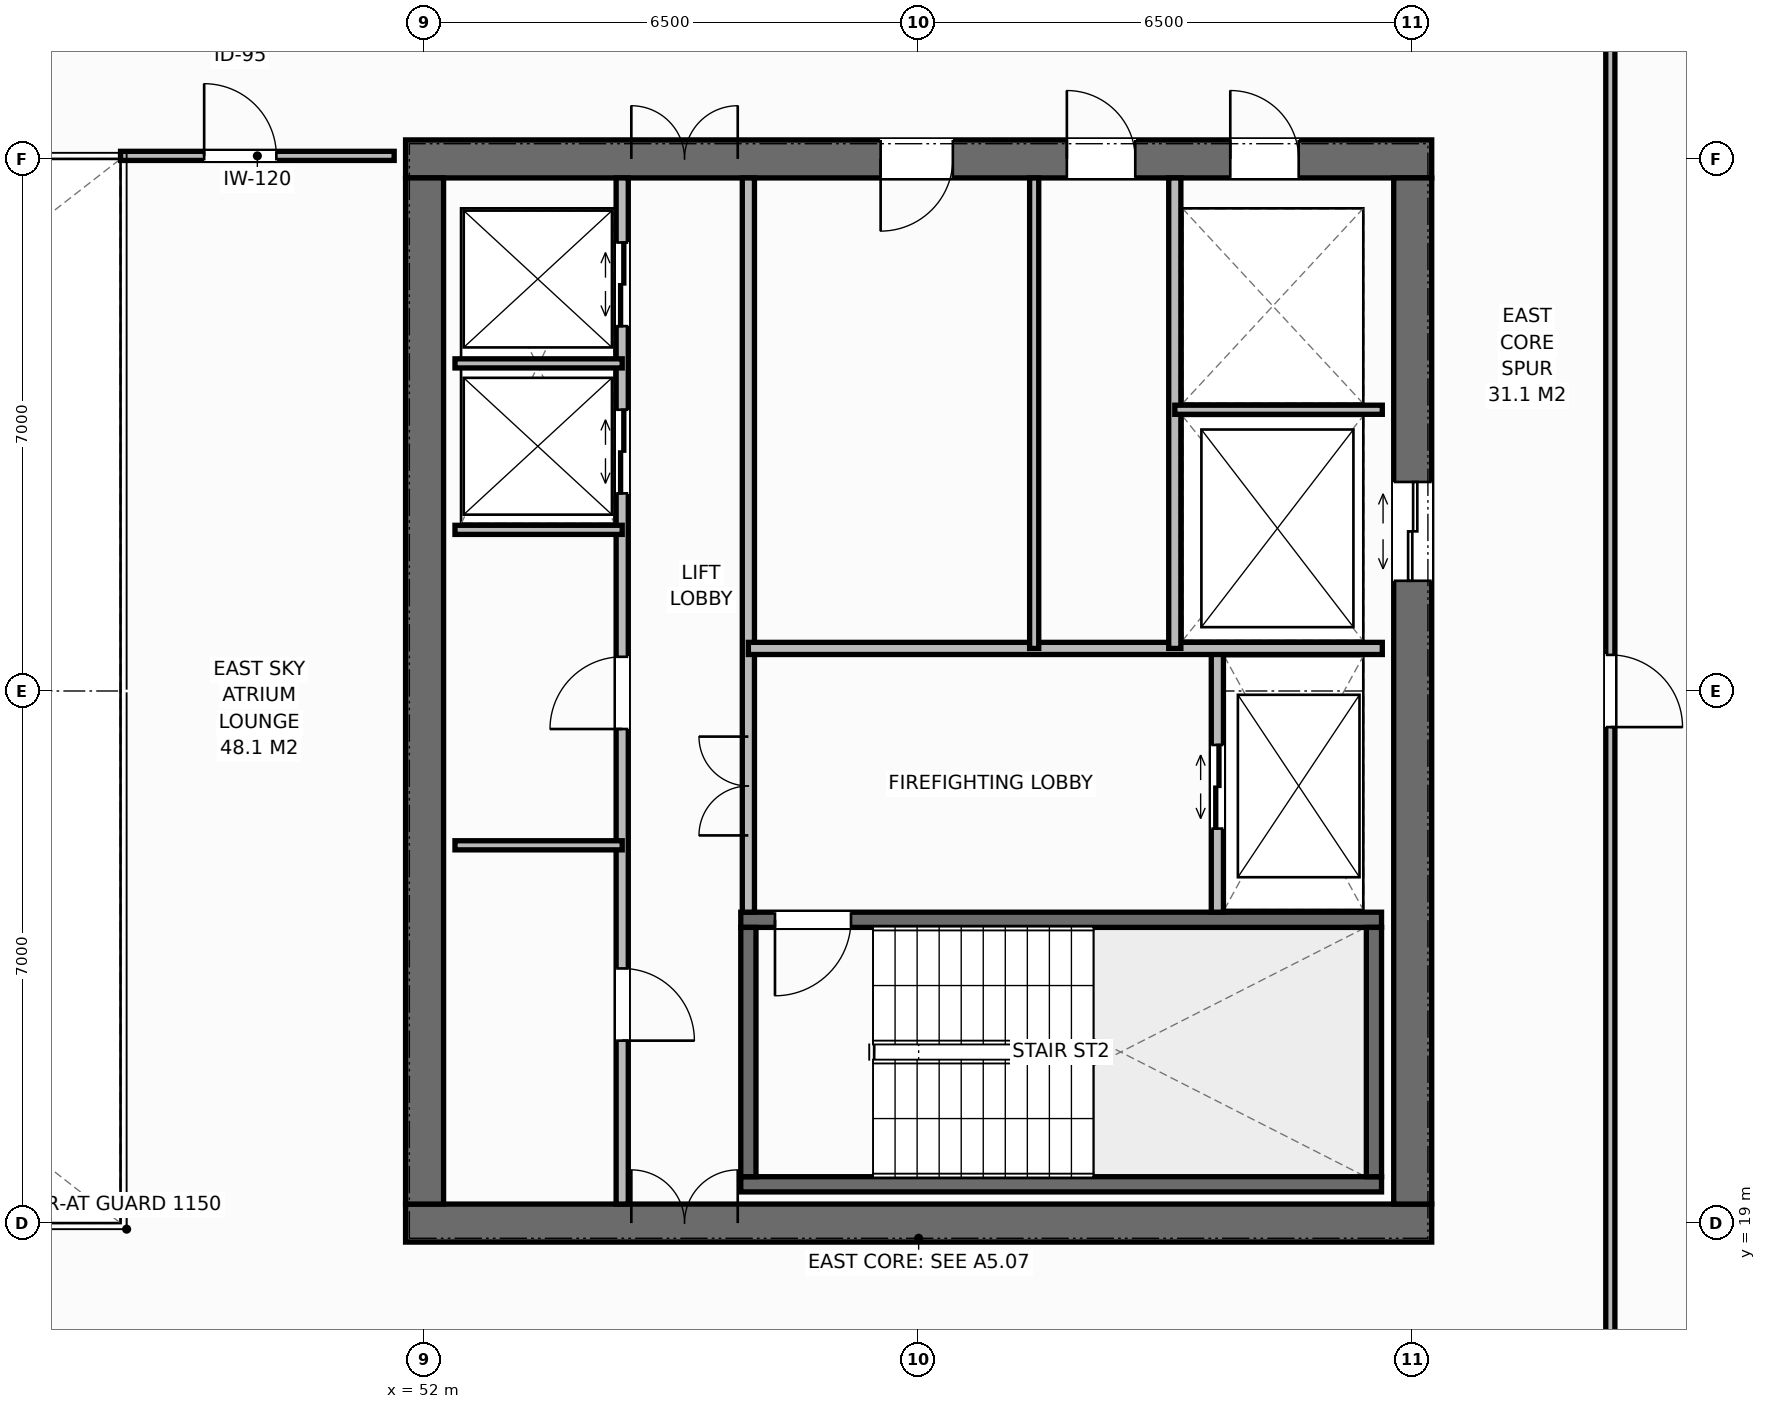
"""IFC4 building model, lengths in metres.
Left out: names, types, materials, properties, quantities, classifications, styles, units other than length and angle.
Written with IfcOpenShell. Run it as: python <this file> out.ifc"""

import sys

from ifc_helpers import new_model, si_unit, direction, frame, frame_2d, origin, place, context, subcontext, project, spatial, rectangle, extrude, element, fill, save


model = new_model("IFC4")
c1 = context("Model", 3, precision=1e-05, world=origin(), true_north=direction((0.0, 1.0)))
c2 = subcontext(c1, "Body", "Model", "MODEL_VIEW")
j1 = project(units=[si_unit("LENGTHUNIT", "METRE"), si_unit("PLANEANGLEUNIT", "RADIAN")], contexts=[c1])
p1 = place(None, origin())
s1 = spatial("IfcSite", under=j1, at=p1, CompositionType="ELEMENT")
p2 = place(p1, origin())
s2 = spatial("IfcBuilding", under=s1, at=p2, CompositionType="ELEMENT")
p3 = place(p2, frame((0.0, 0.0, 232.8)))
s3 = spatial("IfcBuildingStorey", under=s2, at=p3, CompositionType="ELEMENT", Elevation=232.8)
p4 = place(p3, frame((51.75, 19.0, 0.0), z_axis=(0.0, 0.0, 1.0), x_axis=(1.0, 0.0, 0.0)))
e1 = element("IfcWall", 1, at=p4, inside=s3, PredefinedType="SHEAR", context=c2, shape_type="SweptSolid", body=[
    extrude(rectangle(XDim=13.5, YDim=0.5, at=frame_2d((6.75, 0.0))), origin(), (0.0, 0.0, 1.0), 3.8),
])
p5 = place(p4, frame((2.97, 0.0, 0.0)))
e2 = element("IfcOpeningElement", 2, at=p5, cuts=e1, PredefinedType="OPENING", context=c2, shape_type="SweptSolid", body=[
    extrude(rectangle(XDim=1.4, YDim=2.2, at=frame_2d((0.7, 1.1))), frame((0.0, 0.26, 0.0), z_axis=(0.0, -1.0, 0.0), x_axis=(1.0, 0.0, 0.0)), (0.0, 0.0, 1.0), 0.52),
])
p6 = place(p3, frame((51.75, 33.0, 0.0), z_axis=(0.0, 0.0, 1.0), x_axis=(1.0, 0.0, 0.0)))
e3 = element("IfcWall", 3, at=p6, inside=s3, PredefinedType="SHEAR", context=c2, shape_type="SweptSolid", body=[
    extrude(rectangle(XDim=13.5, YDim=0.5, at=frame_2d((6.75, 0.0))), origin(), (0.0, 0.0, 1.0), 3.8),
])
p7 = place(p6, frame((2.97, 0.0, 0.0)))
e4 = element("IfcOpeningElement", 4, at=p7, cuts=e3, PredefinedType="OPENING", context=c2, shape_type="SweptSolid", body=[
    extrude(rectangle(XDim=1.4, YDim=2.2, at=frame_2d((0.7, 1.1))), frame((0.0, 0.26, 0.0), z_axis=(0.0, -1.0, 0.0), x_axis=(1.0, 0.0, 0.0)), (0.0, 0.0, 1.0), 0.52),
])
p8 = place(p6, frame((10.85, 0.0, 0.0)))
e5 = element("IfcOpeningElement", 5, at=p8, cuts=e3, PredefinedType="OPENING", context=c2, shape_type="SweptSolid", body=[
    extrude(rectangle(XDim=0.9, YDim=2.15, at=frame_2d((0.45, 1.075))), frame((0.0, 0.26, 0.0), z_axis=(0.0, -1.0, 0.0), x_axis=(1.0, 0.0, 0.0)), (0.0, 0.0, 1.0), 0.52),
])
p9 = place(p6, frame((6.25, 0.0, 0.0)))
e6 = element("IfcOpeningElement", 6, at=p9, cuts=e3, PredefinedType="OPENING", context=c2, shape_type="SweptSolid", body=[
    extrude(rectangle(XDim=0.95, YDim=2.15, at=frame_2d((0.475, 1.075))), frame((0.0, 0.26, 0.0), z_axis=(0.0, -1.0, 0.0), x_axis=(1.0, 0.0, 0.0)), (0.0, 0.0, 1.0), 0.52),
])
p10 = place(p6, frame((8.7, 0.0, 0.0)))
e7 = element("IfcOpeningElement", 7, at=p10, cuts=e3, PredefinedType="OPENING", context=c2, shape_type="SweptSolid", body=[
    extrude(rectangle(XDim=0.9, YDim=2.15, at=frame_2d((0.45, 1.075))), frame((0.0, 0.26, 0.0), z_axis=(0.0, -1.0, 0.0), x_axis=(1.0, 0.0, 0.0)), (0.0, 0.0, 1.0), 0.52),
])
p11 = place(p3, frame((52.0, 19.25, 0.0), z_axis=(0.0, 0.0, 1.0), x_axis=(0.0, 1.0, 0.0)))
e8 = element("IfcWall", 8, at=p11, inside=s3, PredefinedType="SHEAR", context=c2, shape_type="SweptSolid", body=[
    extrude(rectangle(XDim=13.5, YDim=0.5, at=frame_2d((6.75, 0.0))), origin(), (0.0, 0.0, 1.0), 3.8),
])
p12 = place(p3, frame((65.0, 19.25, 0.0), z_axis=(0.0, 0.0, 1.0), x_axis=(0.0, 1.0, 0.0)))
e9 = element("IfcWall", 9, at=p12, inside=s3, PredefinedType="SHEAR", context=c2, shape_type="SweptSolid", body=[
    extrude(rectangle(XDim=13.5, YDim=0.5, at=frame_2d((6.75, 0.0))), origin(), (0.0, 0.0, 1.0), 3.8),
])
p13 = place(p12, frame((8.2, 0.0, 0.0)))
e10 = element("IfcOpeningElement", 10, at=p13, cuts=e9, PredefinedType="OPENING", context=c2, shape_type="SweptSolid", body=[
    extrude(rectangle(XDim=1.3, YDim=2.2, at=frame_2d((0.65, 1.1))), frame((0.0, 0.26, 0.0), z_axis=(0.0, -1.0, 0.0), x_axis=(1.0, 0.0, 0.0)), (0.0, 0.0, 1.0), 0.52),
])
p14 = place(p3, frame((56.16, 19.51, 0.0), z_axis=(0.0, 0.0, 1.0), x_axis=(1.0, 0.0, 0.0)))
e11 = element("IfcWall", 11, at=p14, inside=s3, PredefinedType="SHEAR", context=c2, shape_type="SweptSolid", body=[
    extrude(rectangle(XDim=8.43, YDim=0.2, at=frame_2d((4.215, 0.0))), origin(), (0.0, 0.0, 1.0), 3.8),
])
p15 = place(p3, frame((56.16, 22.99, 0.0), z_axis=(0.0, 0.0, 1.0), x_axis=(1.0, 0.0, 0.0)))
e12 = element("IfcWall", 12, at=p15, inside=s3, PredefinedType="SHEAR", context=c2, shape_type="SweptSolid", body=[
    extrude(rectangle(XDim=8.43, YDim=0.2, at=frame_2d((4.215, 0.0))), origin(), (0.0, 0.0, 1.0), 3.8),
])
p16 = place(p15, frame((0.45, 0.0, 0.0)))
e13 = element("IfcOpeningElement", 13, at=p16, cuts=e12, PredefinedType="OPENING", context=c2, shape_type="SweptSolid", body=[
    extrude(rectangle(XDim=1.0, YDim=2.15, at=frame_2d((0.5, 1.075))), frame((0.0, 0.11, 0.0), z_axis=(0.0, -1.0, 0.0), x_axis=(1.0, 0.0, 0.0)), (0.0, 0.0, 1.0), 0.22),
])
for number, where, z_axis, x_axis in (
    (14, (56.26, 19.61, 0.0), (0.0, 0.0, 1.0), (0.0, 1.0, 0.0)),
    (15, (64.49, 19.61, 0.0), (0.0, 0.0, 1.0), (0.0, 1.0, 0.0)),
):
    element("IfcWall", number, at=place(p3, frame(where, z_axis=z_axis, x_axis=x_axis)), inside=s3, PredefinedType="SHEAR", context=c2, shape_type="SweptSolid", body=[
        extrude(rectangle(XDim=3.28, YDim=0.2, at=frame_2d((1.64, 0.0))), origin(), (0.0, 0.0, 1.0), 3.8),
    ])
p17 = place(p3, frame((54.6, 19.25, 0.0), z_axis=(0.0, 0.0, 1.0), x_axis=(0.0, 1.0, 0.0)))
e16 = element("IfcWall", 16, at=p17, inside=s3, PredefinedType="STANDARD", context=c2, shape_type="SweptSolid", body=[
    extrude(rectangle(XDim=13.5, YDim=0.16, at=frame_2d((6.75, 0.0))), origin(), (0.0, 0.0, 1.0), 3.58),
])
p18 = place(p17, frame((2.15, 0.0, 0.0)))
e17 = element("IfcOpeningElement", 17, at=p18, cuts=e16, PredefinedType="OPENING", context=c2, shape_type="SweptSolid", body=[
    extrude(rectangle(XDim=0.95, YDim=2.15, at=frame_2d((0.475, 1.075))), frame((0.0, 0.09, 0.0), z_axis=(0.0, -1.0, 0.0), x_axis=(1.0, 0.0, 0.0)), (0.0, 0.0, 1.0), 0.18),
])
p19 = place(p17, frame((6.25, 0.0, 0.0)))
e18 = element("IfcOpeningElement", 18, at=p19, cuts=e16, PredefinedType="OPENING", context=c2, shape_type="SweptSolid", body=[
    extrude(rectangle(XDim=0.95, YDim=2.15, at=frame_2d((0.475, 1.075))), frame((0.0, 0.09, 0.0), z_axis=(0.0, -1.0, 0.0), x_axis=(1.0, 0.0, 0.0)), (0.0, 0.0, 1.0), 0.18),
])
p20 = place(p17, frame((9.35, 0.0, 0.0)))
e19 = element("IfcOpeningElement", 19, at=p20, cuts=e16, PredefinedType="OPENING", context=c2, shape_type="SweptSolid", body=[
    extrude(rectangle(XDim=1.1, YDim=2.2, at=frame_2d((0.55, 1.1))), frame((0.0, 0.09, 0.0), z_axis=(0.0, -1.0, 0.0), x_axis=(1.0, 0.0, 0.0)), (0.0, 0.0, 1.0), 0.18),
])
p21 = place(p17, frame((11.55, 0.0, 0.0)))
e20 = element("IfcOpeningElement", 20, at=p21, cuts=e16, PredefinedType="OPENING", context=c2, shape_type="SweptSolid", body=[
    extrude(rectangle(XDim=1.1, YDim=2.2, at=frame_2d((0.55, 1.1))), frame((0.0, 0.09, 0.0), z_axis=(0.0, -1.0, 0.0), x_axis=(1.0, 0.0, 0.0)), (0.0, 0.0, 1.0), 0.18),
])
p22 = place(p3, frame((56.26, 23.09, 0.0), z_axis=(0.0, 0.0, 1.0), x_axis=(0.0, 1.0, 0.0)))
e21 = element("IfcWall", 21, at=p22, inside=s3, PredefinedType="STANDARD", context=c2, shape_type="SweptSolid", body=[
    extrude(rectangle(XDim=9.66, YDim=0.16, at=frame_2d((4.83, 0.0))), origin(), (0.0, 0.0, 1.0), 3.58),
])
p23 = place(p22, frame((1.01, 0.0, 0.0)))
e22 = element("IfcOpeningElement", 22, at=p23, cuts=e21, PredefinedType="OPENING", context=c2, shape_type="SweptSolid", body=[
    extrude(rectangle(XDim=1.3, YDim=2.2, at=frame_2d((0.65, 1.1))), frame((0.0, 0.09, 0.0), z_axis=(0.0, -1.0, 0.0), x_axis=(1.0, 0.0, 0.0)), (0.0, 0.0, 1.0), 0.18),
])
for number, where, z_axis, x_axis in (
    (23, (52.4, 23.97, 0.0), (0.0, 0.0, 1.0), (1.0, 0.0, 0.0)),
    (24, (52.4, 28.12, 0.0), (0.0, 0.0, 1.0), (1.0, 0.0, 0.0)),
    (25, (52.4, 30.31, 0.0), (0.0, 0.0, 1.0), (1.0, 0.0, 0.0)),
):
    element("IfcWall", number, at=place(p3, frame(where, z_axis=z_axis, x_axis=x_axis)), inside=s3, PredefinedType="PARTITIONING", context=c2, shape_type="SweptSolid", body=[
        extrude(rectangle(XDim=2.2, YDim=0.12, at=frame_2d((1.1, 0.0))), origin(), (0.0, 0.0, 1.0), 3.58),
    ])
p24 = place(p3, frame((62.43, 23.09, 0.0), z_axis=(0.0, 0.0, 1.0), x_axis=(0.0, 1.0, 0.0)))
e26 = element("IfcWall", 26, at=p24, inside=s3, PredefinedType="STANDARD", context=c2, shape_type="SweptSolid", body=[
    extrude(rectangle(XDim=3.47, YDim=0.16, at=frame_2d((1.735, 0.0))), origin(), (0.0, 0.0, 1.0), 3.58),
])
p25 = place(p24, frame((1.1, 0.0, 0.0)))
e27 = element("IfcOpeningElement", 27, at=p25, cuts=e26, PredefinedType="OPENING", context=c2, shape_type="SweptSolid", body=[
    extrude(rectangle(XDim=1.1, YDim=2.2, at=frame_2d((0.55, 1.1))), frame((0.0, 0.09, 0.0), z_axis=(0.0, -1.0, 0.0), x_axis=(1.0, 0.0, 0.0)), (0.0, 0.0, 1.0), 0.18),
])
p26 = place(p3, frame((56.26, 26.56, 0.0), z_axis=(0.0, 0.0, 1.0), x_axis=(1.0, 0.0, 0.0)))
e28 = element("IfcWall", 28, at=p26, inside=s3, PredefinedType="STANDARD", context=c2, shape_type="SweptSolid", body=[
    extrude(rectangle(XDim=8.34, YDim=0.16, at=frame_2d((4.17, 0.0))), origin(), (0.0, 0.0, 1.0), 3.58),
])
p27 = place(p3, frame((61.87, 26.56, 0.0), z_axis=(0.0, 0.0, 1.0), x_axis=(0.0, 1.0, 0.0)))
e29 = element("IfcWall", 29, at=p27, inside=s3, PredefinedType="STANDARD", context=c2, shape_type="SweptSolid", body=[
    extrude(rectangle(XDim=6.19, YDim=0.16, at=frame_2d((3.095, 0.0))), origin(), (0.0, 0.0, 1.0), 3.58),
])
p28 = place(p3, frame((61.87, 29.7, 0.0), z_axis=(0.0, 0.0, 1.0), x_axis=(1.0, 0.0, 0.0)))
e30 = element("IfcWall", 30, at=p28, inside=s3, PredefinedType="PARTITIONING", context=c2, shape_type="SweptSolid", body=[
    extrude(rectangle(XDim=2.73, YDim=0.12, at=frame_2d((1.365, 0.0))), origin(), (0.0, 0.0, 1.0), 3.58),
])
p29 = place(p3, frame((60.02, 26.56, 0.0), z_axis=(0.0, 0.0, 1.0), x_axis=(0.0, 1.0, 0.0)))
e31 = element("IfcWall", 31, at=p29, inside=s3, PredefinedType="PARTITIONING", context=c2, shape_type="SweptSolid", body=[
    extrude(rectangle(XDim=6.19, YDim=0.12, at=frame_2d((3.095, 0.0))), origin(), (0.0, 0.0, 1.0), 3.58),
])
p30 = place(p3, frame((48.0, 33.04, 0.0), z_axis=(0.0, 0.0, 1.0), x_axis=(1.0, 0.0, 0.0)))
e32 = element("IfcWall", 32, at=p30, inside=s3, PredefinedType="PARTITIONING", context=c2, shape_type="SweptSolid", body=[
    extrude(rectangle(XDim=3.6, YDim=0.12, at=frame_2d((1.8, 0.0))), origin(), (0.0, 0.0, 1.0), 3.32),
])
p31 = place(p30, frame((1.1, 0.0, 0.0)))
e33 = element("IfcOpeningElement", 33, at=p31, cuts=e32, PredefinedType="OPENING", context=c2, shape_type="SweptSolid", body=[
    extrude(rectangle(XDim=0.95, YDim=2.15, at=frame_2d((0.475, 1.075))), frame((0.0, 0.07, 0.0), z_axis=(0.0, -1.0, 0.0), x_axis=(1.0, 0.0, 0.0)), (0.0, 0.0, 1.0), 0.14),
])
p32 = place(p3, frame((67.6, 16.5, 0.0), z_axis=(0.0, 0.0, 1.0), x_axis=(0.0, 1.0, 0.0)))
e34 = element("IfcWall", 34, at=p32, inside=s3, PredefinedType="PARTITIONING", context=c2, shape_type="SweptSolid", body=[
    extrude(rectangle(XDim=19.0, YDim=0.12, at=frame_2d((9.5, 0.0))), origin(), (0.0, 0.0, 1.0), 3.58),
])
p33 = place(p32, frame((9.025, 0.0, 0.0)))
e35 = element("IfcOpeningElement", 35, at=p33, cuts=e34, PredefinedType="OPENING", context=c2, shape_type="SweptSolid", body=[
    extrude(rectangle(XDim=0.95, YDim=2.15, at=frame_2d((0.475, 1.075))), frame((0.0, 0.07, 0.0), z_axis=(0.0, -1.0, 0.0), x_axis=(1.0, 0.0, 0.0)), (0.0, 0.0, 1.0), 0.14),
])
p34 = place(p5, origin())
e36 = element("IfcDoor", 36, at=p34, inside=s3, OperationType="DOUBLE_DOOR_SINGLE_SWING", PredefinedType="DOOR", context=c2, shape_type="SweptSolid", body=[
    extrude(rectangle(XDim=1.4, YDim=2.2, at=frame_2d((0.7, 1.1))), frame((0.0, 0.075, 0.0), z_axis=(0.0, -1.0, 0.0), x_axis=(1.0, 0.0, 0.0)), (0.0, 0.0, 1.0), 0.05),
])
fill(e2, e36)
p35 = place(p7, origin())
e37 = element("IfcDoor", 37, at=p35, inside=s3, OperationType="DOUBLE_DOOR_SINGLE_SWING", PredefinedType="DOOR", context=c2, shape_type="SweptSolid", body=[
    extrude(rectangle(XDim=1.4, YDim=2.2, at=frame_2d((0.7, 1.1))), frame((0.0, -0.025, 0.0), z_axis=(0.0, -1.0, 0.0), x_axis=(1.0, 0.0, 0.0)), (0.0, 0.0, 1.0), 0.05),
])
fill(e4, e37)
p36 = place(p18, origin())
e38 = element("IfcDoor", 38, at=p36, inside=s3, OperationType="SINGLE_SWING_RIGHT", PredefinedType="DOOR", context=c2, shape_type="SweptSolid", body=[
    extrude(rectangle(XDim=0.95, YDim=2.15, at=frame_2d((0.475, 1.075))), frame((0.0, 0.025, 0.0), z_axis=(0.0, -1.0, 0.0), x_axis=(1.0, 0.0, 0.0)), (0.0, 0.0, 1.0), 0.05),
])
fill(e17, e38)
p37 = place(p19, origin())
e39 = element("IfcDoor", 39, at=p37, inside=s3, OperationType="SINGLE_SWING_LEFT", PredefinedType="DOOR", context=c2, shape_type="SweptSolid", body=[
    extrude(rectangle(XDim=0.95, YDim=2.15, at=frame_2d((0.475, 1.075))), frame((0.0, 0.025, 0.0), z_axis=(0.0, -1.0, 0.0), x_axis=(1.0, 0.0, 0.0)), (0.0, 0.0, 1.0), 0.05),
])
fill(e18, e39)
p38 = place(p20, origin())
e40 = element("IfcDoor", 40, at=p38, inside=s3, OperationType="DOUBLE_DOOR_SLIDING", PredefinedType="DOOR", context=c2, shape_type="SweptSolid", body=[
    extrude(rectangle(XDim=1.1, YDim=2.2, at=frame_2d((0.55, 1.1))), frame((0.0, 0.025, 0.0), z_axis=(0.0, -1.0, 0.0), x_axis=(1.0, 0.0, 0.0)), (0.0, 0.0, 1.0), 0.05),
])
fill(e19, e40)
p39 = place(p21, origin())
e41 = element("IfcDoor", 41, at=p39, inside=s3, OperationType="DOUBLE_DOOR_SLIDING", PredefinedType="DOOR", context=c2, shape_type="SweptSolid", body=[
    extrude(rectangle(XDim=1.1, YDim=2.2, at=frame_2d((0.55, 1.1))), frame((0.0, 0.025, 0.0), z_axis=(0.0, -1.0, 0.0), x_axis=(1.0, 0.0, 0.0)), (0.0, 0.0, 1.0), 0.05),
])
fill(e20, e41)
p40 = place(p16, origin())
e42 = element("IfcDoor", 42, at=p40, inside=s3, OperationType="SINGLE_SWING_RIGHT", PredefinedType="DOOR", context=c2, shape_type="SweptSolid", body=[
    extrude(rectangle(XDim=1.0, YDim=2.15, at=frame_2d((0.5, 1.075))), frame((0.0, 0.025, 0.0), z_axis=(0.0, -1.0, 0.0), x_axis=(1.0, 0.0, 0.0)), (0.0, 0.0, 1.0), 0.05),
])
fill(e13, e42)
p41 = place(p25, origin())
e43 = element("IfcDoor", 43, at=p41, inside=s3, OperationType="DOUBLE_DOOR_SLIDING", PredefinedType="DOOR", context=c2, shape_type="SweptSolid", body=[
    extrude(rectangle(XDim=1.1, YDim=2.2, at=frame_2d((0.55, 1.1))), frame((0.0, 0.025, 0.0), z_axis=(0.0, -1.0, 0.0), x_axis=(1.0, 0.0, 0.0)), (0.0, 0.0, 1.0), 0.05),
])
fill(e27, e43)
p42 = place(p23, origin())
e44 = element("IfcDoor", 44, at=p42, inside=s3, OperationType="DOUBLE_DOOR_SINGLE_SWING", PredefinedType="DOOR", context=c2, shape_type="SweptSolid", body=[
    extrude(rectangle(XDim=1.3, YDim=2.2, at=frame_2d((0.65, 1.1))), frame((0.0, 0.025, 0.0), z_axis=(0.0, -1.0, 0.0), x_axis=(1.0, 0.0, 0.0)), (0.0, 0.0, 1.0), 0.05),
])
fill(e22, e44)
p43 = place(p13, origin())
e45 = element("IfcDoor", 45, at=p43, inside=s3, OperationType="DOUBLE_DOOR_SLIDING", PredefinedType="DOOR", context=c2, shape_type="SweptSolid", body=[
    extrude(rectangle(XDim=1.3, YDim=2.2, at=frame_2d((0.65, 1.1))), frame((0.0, 0.025, 0.0), z_axis=(0.0, -1.0, 0.0), x_axis=(1.0, 0.0, 0.0)), (0.0, 0.0, 1.0), 0.05),
])
fill(e10, e45)
p44 = place(p8, origin())
e46 = element("IfcDoor", 46, at=p44, inside=s3, OperationType="SINGLE_SWING_LEFT", PredefinedType="DOOR", context=c2, shape_type="SweptSolid", body=[
    extrude(rectangle(XDim=0.9, YDim=2.15, at=frame_2d((0.45, 1.075))), frame((0.0, -0.025, 0.0), z_axis=(0.0, -1.0, 0.0), x_axis=(1.0, 0.0, 0.0)), (0.0, 0.0, 1.0), 0.05),
])
fill(e5, e46)
p45 = place(p9, origin())
e47 = element("IfcDoor", 47, at=p45, inside=s3, OperationType="SINGLE_SWING_RIGHT", PredefinedType="DOOR", context=c2, shape_type="SweptSolid", body=[
    extrude(rectangle(XDim=0.95, YDim=2.15, at=frame_2d((0.475, 1.075))), frame((0.0, -0.025, 0.0), z_axis=(0.0, -1.0, 0.0), x_axis=(1.0, 0.0, 0.0)), (0.0, 0.0, 1.0), 0.05),
])
fill(e6, e47)
p46 = place(p10, origin())
e48 = element("IfcDoor", 48, at=p46, inside=s3, OperationType="SINGLE_SWING_LEFT", PredefinedType="DOOR", context=c2, shape_type="SweptSolid", body=[
    extrude(rectangle(XDim=0.9, YDim=2.15, at=frame_2d((0.45, 1.075))), frame((0.0, -0.025, 0.0), z_axis=(0.0, -1.0, 0.0), x_axis=(1.0, 0.0, 0.0)), (0.0, 0.0, 1.0), 0.05),
])
fill(e7, e48)
p47 = place(p31, origin())
e49 = element("IfcDoor", 49, at=p47, inside=s3, OperationType="SINGLE_SWING_LEFT", PredefinedType="DOOR", context=c2, shape_type="SweptSolid", body=[
    extrude(rectangle(XDim=0.95, YDim=2.15, at=frame_2d((0.475, 1.075))), frame((0.0, 0.025, 0.0), z_axis=(0.0, -1.0, 0.0), x_axis=(1.0, 0.0, 0.0)), (0.0, 0.0, 1.0), 0.05),
])
fill(e33, e49)
p48 = place(p33, origin())
e50 = element("IfcDoor", 50, at=p48, inside=s3, OperationType="SINGLE_SWING_RIGHT", PredefinedType="DOOR", context=c2, shape_type="SweptSolid", body=[
    extrude(rectangle(XDim=0.95, YDim=2.15, at=frame_2d((0.475, 1.075))), frame((0.0, 0.025, 0.0), z_axis=(0.0, -1.0, 0.0), x_axis=(1.0, 0.0, 0.0)), (0.0, 0.0, 1.0), 0.05),
])
fill(e35, e50)
save(model, sys.argv[1])
